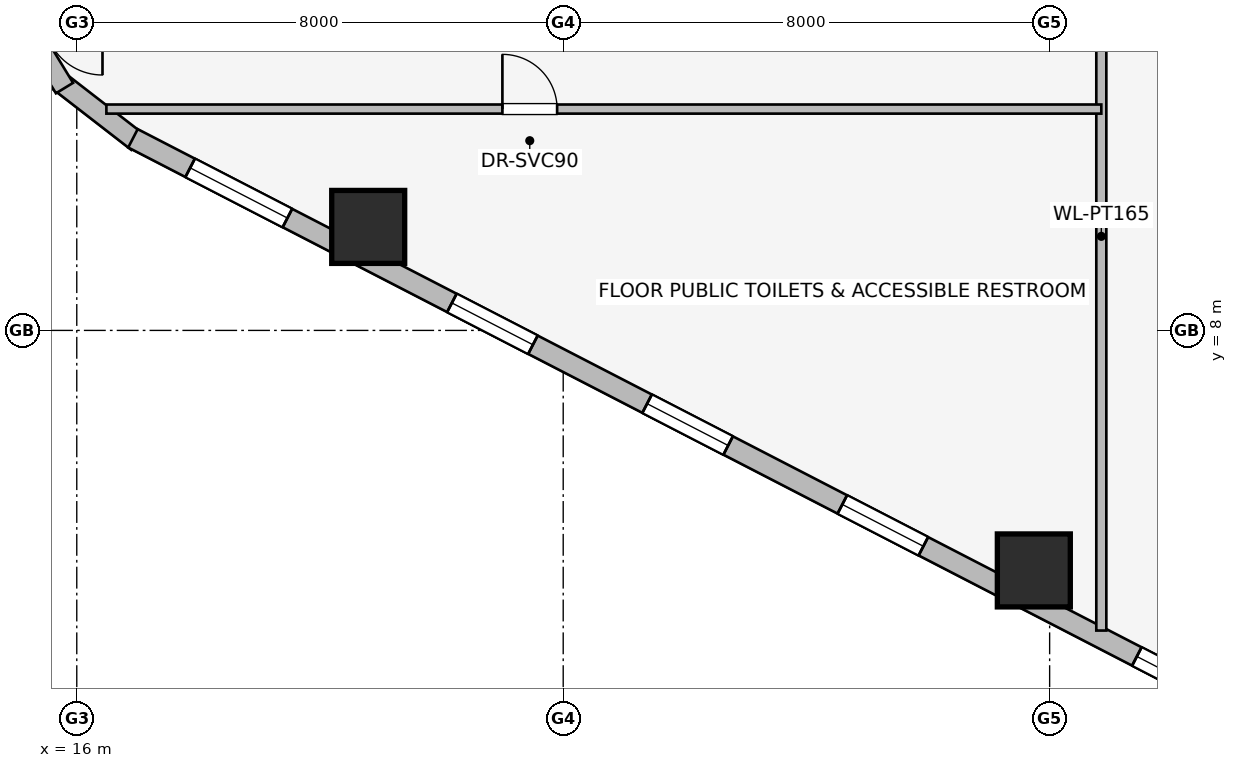
"""IFC4 building model, lengths in metres.
Left out: names, types, materials, properties, quantities, classifications, styles, units other than length and angle.
Written with IfcOpenShell. Run it as: python <this file> out.ifc"""

import sys

from ifc_helpers import new_model, si_unit, direction, frame, frame_2d, origin, origin_2d, place, context, subcontext, project, spatial, rectangle, extrude, element, fill, save


model = new_model("IFC4")
c1 = context("Model", 3, precision=1e-05, world=origin(), true_north=direction((0.0, 1.0)))
c2 = subcontext(c1, "Body", "Model", "MODEL_VIEW")
j1 = project(units=[si_unit("LENGTHUNIT", "METRE"), si_unit("PLANEANGLEUNIT", "RADIAN")], contexts=[c1])
p1 = place(None, origin())
s1 = spatial("IfcSite", under=j1, at=p1, CompositionType="ELEMENT")
p2 = place(p1, origin())
s2 = spatial("IfcBuilding", under=s1, at=p2, CompositionType="ELEMENT")
p3 = place(p2, frame((0.0, 0.0, 89.05)))
s3 = spatial("IfcBuildingStorey", under=s2, at=p3, CompositionType="ELEMENT", Elevation=89.05)
for number, where, z_axis, x_axis in (
    (1, (20.793, 9.702, 0.0), (0.0, 0.0, 1.0), (1.0, 0.0, 0.0)),
    (2, (31.74, 4.053, 0.0), (0.0, 0.0, 1.0), (1.0, 0.0, 0.0)),
):
    element("IfcColumn", number, at=place(p3, frame(where, z_axis=z_axis, x_axis=x_axis)), inside=s3, PredefinedType="COLUMN", context=c2, shape_type="SweptSolid", body=[
        extrude(rectangle(XDim=1.2, YDim=1.2, at=origin_2d()), origin(), (0.0, 0.0, 1.0), 3.65),
    ])
p4 = place(p3, frame((16.998, 11.099, 0.0), z_axis=(0.0, 0.0, 1.0), x_axis=(-0.790691856293, 0.61221433207, 0.0)))
e3 = element("IfcWall", 3, at=p4, inside=s3, PredefinedType="STANDARD", context=c2, shape_type="SweptSolid", body=[
    extrude(rectangle(XDim=1.676, YDim=0.33, at=frame_2d((0.838, 0.0))), origin(), (0.0, 0.0, 1.0), 3.39),
])
p5 = place(p3, frame((15.798, 11.985, 0.0), z_axis=(0.0, 0.0, 1.0), x_axis=(-0.520584129191, 0.853810379671, 0.0)))
e4 = element("IfcWall", 4, at=p5, inside=s3, PredefinedType="STANDARD", context=c2, shape_type="SweptSolid", body=[
    extrude(rectangle(XDim=1.677, YDim=0.33, at=frame_2d((0.838, 0.0))), origin(), (0.0, 0.0, 1.0), 3.39),
])
p6 = place(p3, frame((35.169, 1.743, 0.0), z_axis=(0.0, 0.0, 1.0), x_axis=(-0.888634413993, 0.458616264721, 0.0)))
e5 = element("IfcWall", 5, at=p6, inside=s3, PredefinedType="STANDARD", context=c2, shape_type="SweptSolid", body=[
    extrude(rectangle(XDim=20.531, YDim=0.34, at=frame_2d((10.266, 0.0))), origin(), (0.0, 0.0, 1.0), 2.684),
])
p7 = place(p6, frame((0.902, 0.0, 0.75)))
e6 = element("IfcOpeningElement", 6, at=p7, cuts=e5, PredefinedType="OPENING", context=c2, shape_type="SweptSolid", body=[
    extrude(rectangle(XDim=1.05, YDim=1.4, at=frame_2d((0.525, 0.7))), frame((0.0, 0.18, 0.0), z_axis=(0.0, -1.0, 0.0), x_axis=(1.0, 0.0, 0.0)), (0.0, 0.0, 1.0), 0.36),
])
p8 = place(p6, frame((5.903, 0.0, 0.75)))
e7 = element("IfcOpeningElement", 7, at=p8, cuts=e5, PredefinedType="OPENING", context=c2, shape_type="SweptSolid", body=[
    extrude(rectangle(XDim=1.5, YDim=1.5, at=frame_2d((0.75, 0.75))), frame((0.0, 0.18, 0.0), z_axis=(0.0, -1.0, 0.0), x_axis=(1.0, 0.0, 0.0)), (0.0, 0.0, 1.0), 0.36),
])
p9 = place(p6, frame((9.516, 0.0, 0.75)))
e8 = element("IfcOpeningElement", 8, at=p9, cuts=e5, PredefinedType="OPENING", context=c2, shape_type="SweptSolid", body=[
    extrude(rectangle(XDim=1.5, YDim=1.5, at=frame_2d((0.75, 0.75))), frame((0.0, 0.18, 0.0), z_axis=(0.0, -1.0, 0.0), x_axis=(1.0, 0.0, 0.0)), (0.0, 0.0, 1.0), 0.36),
])
p10 = place(p6, frame((13.129, 0.0, 0.75)))
e9 = element("IfcOpeningElement", 9, at=p10, cuts=e5, PredefinedType="OPENING", context=c2, shape_type="SweptSolid", body=[
    extrude(rectangle(XDim=1.5, YDim=1.5, at=frame_2d((0.75, 0.75))), frame((0.0, 0.18, 0.0), z_axis=(0.0, -1.0, 0.0), x_axis=(1.0, 0.0, 0.0)), (0.0, 0.0, 1.0), 0.36),
])
p11 = place(p6, frame((17.673, 0.0, 0.75)))
e10 = element("IfcOpeningElement", 10, at=p11, cuts=e5, PredefinedType="OPENING", context=c2, shape_type="SweptSolid", body=[
    extrude(rectangle(XDim=1.8, YDim=1.5, at=frame_2d((0.9, 0.75))), frame((0.0, 0.18, 0.0), z_axis=(0.0, -1.0, 0.0), x_axis=(1.0, 0.0, 0.0)), (0.0, 0.0, 1.0), 0.36),
])
p12 = place(p3, frame((32.85, 3.064, 0.0), z_axis=(0.0, 0.0, 1.0), x_axis=(0.0, 1.0, 0.0)))
e11 = element("IfcWall", 11, at=p12, inside=s3, PredefinedType="PARTITIONING", context=c2, shape_type="SweptSolid", body=[
    extrude(rectangle(XDim=12.966, YDim=0.165, at=frame_2d((6.483, 0.0))), origin(), (0.0, 0.0, 1.0), 3.39),
])
p13 = place(p3, frame((16.487, 11.64, 0.0), z_axis=(0.0, 0.0, 1.0), x_axis=(1.0, 0.0, 0.0)))
e12 = element("IfcWall", 12, at=p13, inside=s3, PredefinedType="PARTITIONING", context=c2, shape_type="SweptSolid", body=[
    extrude(rectangle(XDim=16.363, YDim=0.15, at=frame_2d((8.182, 0.0))), origin(), (0.0, 0.0, 1.0), 3.39),
])
p14 = place(p13, frame((6.513, 0.0, 0.0)))
e13 = element("IfcOpeningElement", 13, at=p14, cuts=e12, PredefinedType="OPENING", context=c2, shape_type="SweptSolid", body=[
    extrude(rectangle(XDim=0.9, YDim=2.0, at=frame_2d((0.45, 1.0))), frame((0.0, 0.085, 0.0), z_axis=(0.0, -1.0, 0.0), x_axis=(1.0, 0.0, 0.0)), (0.0, 0.0, 1.0), 0.17),
])
p15 = place(p7, origin())
e14 = element("IfcWindow", 14, at=p15, inside=s3, PartitioningType="SINGLE_PANEL", PredefinedType="WINDOW", context=c2, shape_type="SweptSolid", body=[
    extrude(rectangle(XDim=1.05, YDim=1.4, at=frame_2d((0.525, 0.7))), frame((0.0, 0.03, 0.0), z_axis=(0.0, -1.0, 0.0), x_axis=(1.0, 0.0, 0.0)), (0.0, 0.0, 1.0), 0.06),
])
fill(e6, e14)
p16 = place(p8, origin())
e15 = element("IfcWindow", 15, at=p16, inside=s3, PartitioningType="SINGLE_PANEL", PredefinedType="WINDOW", context=c2, shape_type="SweptSolid", body=[
    extrude(rectangle(XDim=1.5, YDim=1.5, at=frame_2d((0.75, 0.75))), frame((0.0, 0.03, 0.0), z_axis=(0.0, -1.0, 0.0), x_axis=(1.0, 0.0, 0.0)), (0.0, 0.0, 1.0), 0.06),
])
fill(e7, e15)
p17 = place(p9, origin())
e16 = element("IfcWindow", 16, at=p17, inside=s3, PartitioningType="SINGLE_PANEL", PredefinedType="WINDOW", context=c2, shape_type="SweptSolid", body=[
    extrude(rectangle(XDim=1.5, YDim=1.5, at=frame_2d((0.75, 0.75))), frame((0.0, 0.03, 0.0), z_axis=(0.0, -1.0, 0.0), x_axis=(1.0, 0.0, 0.0)), (0.0, 0.0, 1.0), 0.06),
])
fill(e8, e16)
p18 = place(p10, origin())
e17 = element("IfcWindow", 17, at=p18, inside=s3, PartitioningType="SINGLE_PANEL", PredefinedType="WINDOW", context=c2, shape_type="SweptSolid", body=[
    extrude(rectangle(XDim=1.5, YDim=1.5, at=frame_2d((0.75, 0.75))), frame((0.0, 0.03, 0.0), z_axis=(0.0, -1.0, 0.0), x_axis=(1.0, 0.0, 0.0)), (0.0, 0.0, 1.0), 0.06),
])
fill(e9, e17)
p19 = place(p11, origin())
e18 = element("IfcWindow", 18, at=p19, inside=s3, PartitioningType="SINGLE_PANEL", PredefinedType="WINDOW", context=c2, shape_type="SweptSolid", body=[
    extrude(rectangle(XDim=1.8, YDim=1.5, at=frame_2d((0.9, 0.75))), frame((0.0, 0.03, 0.0), z_axis=(0.0, -1.0, 0.0), x_axis=(1.0, 0.0, 0.0)), (0.0, 0.0, 1.0), 0.06),
])
fill(e10, e18)
p20 = place(p14, origin())
e19 = element("IfcDoor", 19, at=p20, inside=s3, OperationType="SINGLE_SWING_LEFT", PredefinedType="DOOR", context=c2, shape_type="SweptSolid", body=[
    extrude(rectangle(XDim=0.9, YDim=2.0, at=frame_2d((0.45, 1.0))), frame((0.0, 0.025, 0.0), z_axis=(0.0, -1.0, 0.0), x_axis=(1.0, 0.0, 0.0)), (0.0, 0.0, 1.0), 0.05),
])
fill(e13, e19)
save(model, sys.argv[1])
